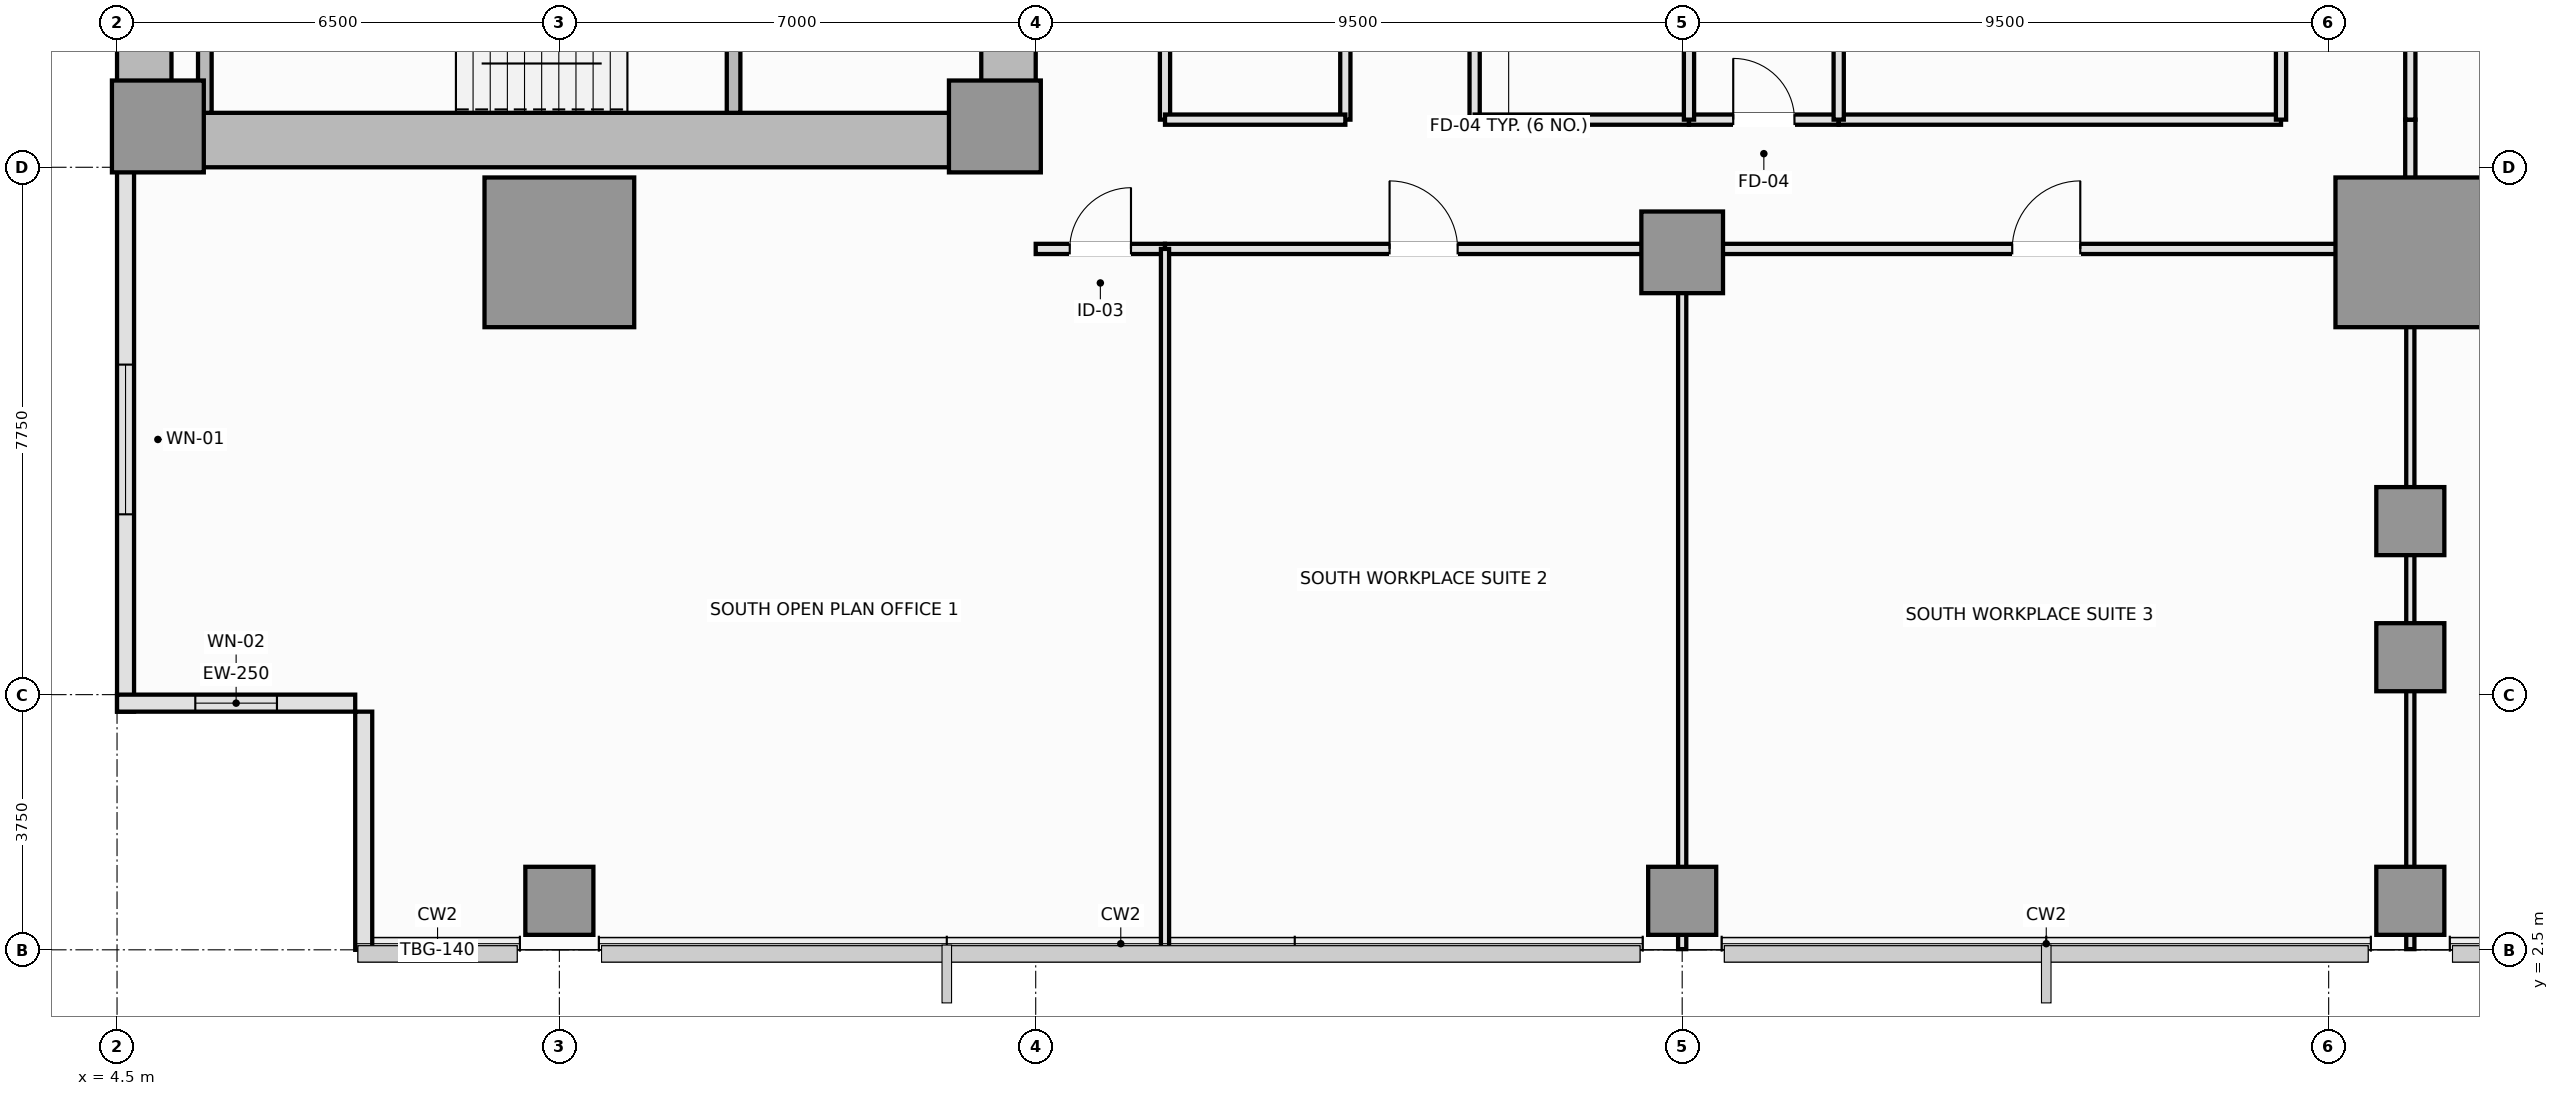
"""IFC4 building model, lengths in metres.
Left out: names, types, materials, properties, quantities, classifications, styles, units other than length and angle.
Written with IfcOpenShell. Run it as: python <this file> out.ifc"""

import sys

from ifc_helpers import new_model, si_unit, direction, frame, frame_2d, origin, origin_2d, place, context, subcontext, project, spatial, rectangle, extrude, element, fill, save


model = new_model("IFC4")
c1 = context("Model", 3, precision=1e-05, world=origin(), true_north=direction((0.0, 1.0)))
c2 = subcontext(c1, "Body", "Model", "MODEL_VIEW")
j1 = project(units=[si_unit("LENGTHUNIT", "METRE"), si_unit("PLANEANGLEUNIT", "RADIAN")], contexts=[c1])
p1 = place(None, origin())
s1 = spatial("IfcSite", under=j1, at=p1, CompositionType="ELEMENT")
p2 = place(p1, origin())
s2 = spatial("IfcBuilding", under=s1, at=p2, CompositionType="ELEMENT")
p3 = place(p2, frame((0.0, 0.0, 29.15)))
s3 = spatial("IfcBuildingStorey", under=s2, at=p3, CompositionType="ELEMENT", Elevation=29.15)
p4 = place(p3, frame((4.5, 14.4, 0.0), z_axis=(0.0, 0.0, 1.0), x_axis=(1.0, 0.0, 0.0)))
e1 = element("IfcWall", 1, at=p4, inside=s3, PredefinedType="SHEAR", context=c2, shape_type="SweptSolid", body=[
    extrude(rectangle(XDim=13.5, YDim=0.8, at=frame_2d((6.75, 0.0))), origin(), (0.0, 0.0, 1.0), 3.55),
])
p5 = place(p3, frame((4.9, 14.8, 0.0), z_axis=(0.0, 0.0, 1.0), x_axis=(0.0, 1.0, 0.0)))
e2 = element("IfcWall", 2, at=p5, inside=s3, PredefinedType="SHEAR", context=c2, shape_type="SweptSolid", body=[
    extrude(rectangle(XDim=20.9, YDim=0.8, at=frame_2d((10.45, 0.0))), origin(), (0.0, 0.0, 1.0), 3.55),
])
p6 = place(p3, frame((17.6, 14.8, 0.0), z_axis=(0.0, 0.0, 1.0), x_axis=(0.0, 1.0, 0.0)))
e3 = element("IfcWall", 3, at=p6, inside=s3, PredefinedType="SHEAR", context=c2, shape_type="SweptSolid", body=[
    extrude(rectangle(XDim=8.65, YDim=0.8, at=frame_2d((4.325, 0.0))), origin(), (0.0, 0.0, 1.0), 3.55),
])
p7 = place(p6, frame((4.1, 0.0, 0.0)))
e4 = element("IfcOpeningElement", 4, at=p7, cuts=e3, PredefinedType="OPENING", context=c2, shape_type="SweptSolid", body=[
    extrude(rectangle(XDim=1.1, YDim=2.15, at=frame_2d((0.55, 1.075))), frame((0.0, 0.41, 0.0), z_axis=(0.0, -1.0, 0.0), x_axis=(1.0, 0.0, 0.0)), (0.0, 0.0, 1.0), 0.82),
])
for number, where, z_axis, x_axis in (
    (5, (5.1, 14.6, 0.0), (0.0, 0.0, 1.0), (1.0, 0.0, 0.0)),
    (6, (17.4, 14.6, 0.0), (0.0, 0.0, 1.0), (1.0, 0.0, 0.0)),
):
    element("IfcColumn", number, at=place(p3, frame(where, z_axis=z_axis, x_axis=x_axis)), inside=s3, PredefinedType="PILASTER", context=c2, shape_type="SweptSolid", body=[
        extrude(rectangle(XDim=1.35, YDim=1.35, at=origin_2d()), origin(), (0.0, 0.0, 1.0), 3.55),
    ])
for number, where, z_axis, x_axis in (
    (7, (11.0, 12.75, 0.0), (0.0, 0.0, 1.0), (1.0, 0.0, 0.0)),
    (8, (38.2, 12.75, 0.0), (0.0, 0.0, 1.0), (1.0, 0.0, 0.0)),
):
    element("IfcColumn", number, at=place(p3, frame(where, z_axis=z_axis, x_axis=x_axis)), inside=s3, PredefinedType="COLUMN", context=c2, shape_type="SweptSolid", body=[
        extrude(rectangle(XDim=2.2, YDim=2.2, at=origin_2d()), origin(), (0.0, 0.0, 1.0), 3.55),
    ])
p8 = place(p3, frame((27.5, 12.75, 0.0), z_axis=(0.0, 0.0, 1.0), x_axis=(1.0, 0.0, 0.0)))
e9 = element("IfcColumn", 9, at=p8, inside=s3, PredefinedType="COLUMN", context=c2, shape_type="SweptSolid", body=[
    extrude(rectangle(XDim=1.2, YDim=1.2, at=origin_2d()), origin(), (0.0, 0.0, 1.0), 3.55),
])
for number, where, z_axis, x_axis in (
    (10, (38.2, 6.8, 0.0), (0.0, 0.0, 1.0), (1.0, 0.0, 0.0)),
    (11, (38.2, 8.8, 0.0), (0.0, 0.0, 1.0), (1.0, 0.0, 0.0)),
    (12, (11.0, 3.22, 0.0), (0.0, 0.0, 1.0), (1.0, 0.0, 0.0)),
    (13, (27.5, 3.22, 0.0), (0.0, 0.0, 1.0), (1.0, 0.0, 0.0)),
    (14, (38.2, 3.22, 0.0), (0.0, 0.0, 1.0), (1.0, 0.0, 0.0)),
):
    element("IfcColumn", number, at=place(p3, frame(where, z_axis=z_axis, x_axis=x_axis)), inside=s3, PredefinedType="COLUMN", context=c2, shape_type="SweptSolid", body=[
        extrude(rectangle(XDim=1.0, YDim=1.0, at=origin_2d()), origin(), (0.0, 0.0, 1.0), 3.55),
    ])
p9 = place(p3, frame((4.625, 14.0, 0.0), z_axis=(0.0, 0.0, 1.0), x_axis=(0.0, -1.0, 0.0)))
e15 = element("IfcWall", 15, at=p9, inside=s3, PredefinedType="SOLIDWALL", context=c2, shape_type="SweptSolid", body=[
    extrude(rectangle(XDim=8.0, YDim=0.25, at=frame_2d((4.0, 0.0))), origin(), (0.0, 0.0, 1.0), 3.37),
])
p10 = place(p9, frame((2.9, 0.0, 0.9)))
e16 = element("IfcOpeningElement", 16, at=p10, cuts=e15, PredefinedType="OPENING", context=c2, shape_type="SweptSolid", body=[
    extrude(rectangle(XDim=2.2, YDim=1.8, at=frame_2d((1.1, 0.9))), frame((0.0, 0.135, 0.0), z_axis=(0.0, -1.0, 0.0), x_axis=(1.0, 0.0, 0.0)), (0.0, 0.0, 1.0), 0.27),
])
p11 = place(p3, frame((4.5, 6.125, 0.0), z_axis=(0.0, 0.0, 1.0), x_axis=(1.0, 0.0, 0.0)))
e17 = element("IfcWall", 17, at=p11, inside=s3, PredefinedType="SOLIDWALL", context=c2, shape_type="SweptSolid", body=[
    extrude(rectangle(XDim=3.5, YDim=0.25, at=frame_2d((1.75, 0.0))), origin(), (0.0, 0.0, 1.0), 3.37),
])
p12 = place(p11, frame((1.15, 0.0, 0.9)))
e18 = element("IfcOpeningElement", 18, at=p12, cuts=e17, PredefinedType="OPENING", context=c2, shape_type="SweptSolid", body=[
    extrude(rectangle(XDim=1.2, YDim=1.8, at=frame_2d((0.6, 0.9))), frame((0.0, 0.135, 0.0), z_axis=(0.0, -1.0, 0.0), x_axis=(1.0, 0.0, 0.0)), (0.0, 0.0, 1.0), 0.27),
])
p13 = place(p3, frame((8.125, 6.0, 0.0), z_axis=(0.0, 0.0, 1.0), x_axis=(0.0, -1.0, 0.0)))
e19 = element("IfcWall", 19, at=p13, inside=s3, PredefinedType="SOLIDWALL", context=c2, shape_type="SweptSolid", body=[
    extrude(rectangle(XDim=3.5, YDim=0.25, at=frame_2d((1.75, 0.0))), origin(), (0.0, 0.0, 1.0), 3.37),
])
p14 = place(p3, frame((5.79, 14.8, 0.0), z_axis=(0.0, 0.0, 1.0), x_axis=(0.0, 1.0, 0.0)))
e20 = element("IfcWall", 20, at=p14, inside=s3, PredefinedType="SOLIDWALL", context=c2, shape_type="SweptSolid", body=[
    extrude(rectangle(XDim=3.05, YDim=0.2, at=frame_2d((1.525, 0.0))), origin(), (0.0, 0.0, 1.0), 3.55),
])
p15 = place(p3, frame((13.56, 14.8, 0.0), z_axis=(0.0, 0.0, 1.0), x_axis=(0.0, 1.0, 0.0)))
e21 = element("IfcWall", 21, at=p15, inside=s3, PredefinedType="SOLIDWALL", context=c2, shape_type="SweptSolid", body=[
    extrude(rectangle(XDim=3.05, YDim=0.2, at=frame_2d((1.525, 0.0))), origin(), (0.0, 0.0, 1.0), 3.55),
])
p16 = place(p15, frame((0.95, 0.0, 0.0)))
e22 = element("IfcOpeningElement", 22, at=p16, cuts=e21, PredefinedType="OPENING", context=c2, shape_type="SweptSolid", body=[
    extrude(rectangle(XDim=1.15, YDim=2.15, at=frame_2d((0.575, 1.075))), frame((0.0, 0.11, 0.0), z_axis=(0.0, -1.0, 0.0), x_axis=(1.0, 0.0, 0.0)), (0.0, 0.0, 1.0), 0.22),
])
p17 = place(p3, frame((22.55, 14.7, 0.0), z_axis=(0.0, 0.0, 1.0), x_axis=(0.0, 1.0, 0.0)))
e23 = element("IfcWall", 23, at=p17, inside=s3, PredefinedType="PARTITIONING", context=c2, shape_type="SweptSolid", body=[
    extrude(rectangle(XDim=3.03, YDim=0.15, at=frame_2d((1.515, 0.0))), origin(), (0.0, 0.0, 1.0), 3.01),
])
p18 = place(p17, frame((1.015, 0.0, 0.0)))
e24 = element("IfcOpeningElement", 24, at=p18, cuts=e23, PredefinedType="OPENING", context=c2, shape_type="SweptSolid", body=[
    extrude(rectangle(XDim=1.0, YDim=2.15, at=frame_2d((0.5, 1.075))), frame((0.0, 0.085, 0.0), z_axis=(0.0, -1.0, 0.0), x_axis=(1.0, 0.0, 0.0)), (0.0, 0.0, 1.0), 0.17),
])
p19 = place(p3, frame((24.45, 14.7, 0.0), z_axis=(0.0, 0.0, 1.0), x_axis=(0.0, 1.0, 0.0)))
e25 = element("IfcWall", 25, at=p19, inside=s3, PredefinedType="PLUMBINGWALL", context=c2, shape_type="SweptSolid", body=[
    extrude(rectangle(XDim=3.1, YDim=0.15, at=frame_2d((1.55, 0.0))), origin(), (0.0, 0.0, 1.0), 3.37),
])
p20 = place(p19, frame((1.1, 0.0, 0.0)))
e26 = element("IfcOpeningElement", 26, at=p20, cuts=e25, PredefinedType="OPENING", context=c2, shape_type="SweptSolid", body=[
    extrude(rectangle(XDim=0.9, YDim=2.1, at=frame_2d((0.45, 1.05))), frame((0.0, 0.085, 0.0), z_axis=(0.0, -1.0, 0.0), x_axis=(1.0, 0.0, 0.0)), (0.0, 0.0, 1.0), 0.17),
])
p21 = place(p3, frame((19.9, 14.7, 0.0), z_axis=(0.0, 0.0, 1.0), x_axis=(0.0, 1.0, 0.0)))
e27 = element("IfcWall", 27, at=p21, inside=s3, PredefinedType="PARTITIONING", context=c2, shape_type="SweptSolid", body=[
    extrude(rectangle(XDim=3.03, YDim=0.15, at=frame_2d((1.515, 0.0))), origin(), (0.0, 0.0, 1.0), 3.37),
])
p22 = place(p3, frame((19.9, 14.7, 0.0), z_axis=(0.0, 0.0, 1.0), x_axis=(1.0, 0.0, 0.0)))
e28 = element("IfcWall", 28, at=p22, inside=s3, PredefinedType="PARTITIONING", context=c2, shape_type="SweptSolid", body=[
    extrude(rectangle(XDim=2.65, YDim=0.15, at=frame_2d((1.325, 0.0))), origin(), (0.0, 0.0, 1.0), 3.37),
])
p23 = place(p3, frame((24.45, 14.7, 0.0), z_axis=(0.0, 0.0, 1.0), x_axis=(1.0, 0.0, 0.0)))
e29 = element("IfcWall", 29, at=p23, inside=s3, PredefinedType="PLUMBINGWALL", context=c2, shape_type="SweptSolid", body=[
    extrude(rectangle(XDim=3.15, YDim=0.15, at=frame_2d((1.575, 0.0))), origin(), (0.0, 0.0, 1.0), 3.37),
])
p24 = place(p3, frame((27.6, 14.7, 0.0), z_axis=(0.0, 0.0, 1.0), x_axis=(1.0, 0.0, 0.0)))
e30 = element("IfcWall", 30, at=p24, inside=s3, PredefinedType="PLUMBINGWALL", context=c2, shape_type="SweptSolid", body=[
    extrude(rectangle(XDim=2.2, YDim=0.15, at=frame_2d((1.1, 0.0))), origin(), (0.0, 0.0, 1.0), 3.37),
])
p25 = place(p24, frame((0.65, 0.0, 0.0)))
e31 = element("IfcOpeningElement", 31, at=p25, cuts=e30, PredefinedType="OPENING", context=c2, shape_type="SweptSolid", body=[
    extrude(rectangle(XDim=0.9, YDim=2.1, at=frame_2d((0.45, 1.05))), frame((0.0, 0.085, 0.0), z_axis=(0.0, -1.0, 0.0), x_axis=(1.0, 0.0, 0.0)), (0.0, 0.0, 1.0), 0.17),
])
p26 = place(p3, frame((29.8, 14.7, 0.0), z_axis=(0.0, 0.0, 1.0), x_axis=(1.0, 0.0, 0.0)))
e32 = element("IfcWall", 32, at=p26, inside=s3, PredefinedType="PARTITIONING", context=c2, shape_type="SweptSolid", body=[
    extrude(rectangle(XDim=6.5, YDim=0.15, at=frame_2d((3.25, 0.0))), origin(), (0.0, 0.0, 1.0), 3.37),
])
p27 = place(p3, frame((18.0, 12.8, 0.0), z_axis=(0.0, 0.0, 1.0), x_axis=(1.0, 0.0, 0.0)))
e33 = element("IfcWall", 33, at=p27, inside=s3, PredefinedType="PARTITIONING", context=c2, shape_type="SweptSolid", body=[
    extrude(rectangle(XDim=1.9, YDim=0.15, at=frame_2d((0.95, 0.0))), origin(), (0.0, 0.0, 1.0), 2.72),
])
p28 = place(p27, frame((0.5, 0.0, 0.0)))
e34 = element("IfcOpeningElement", 34, at=p28, cuts=e33, PredefinedType="OPENING", context=c2, shape_type="SweptSolid", body=[
    extrude(rectangle(XDim=0.9, YDim=2.1, at=frame_2d((0.45, 1.05))), frame((0.0, 0.085, 0.0), z_axis=(0.0, -1.0, 0.0), x_axis=(1.0, 0.0, 0.0)), (0.0, 0.0, 1.0), 0.17),
])
p29 = place(p3, frame((19.9, 12.8, 0.0), z_axis=(0.0, 0.0, 1.0), x_axis=(1.0, 0.0, 0.0)))
e35 = element("IfcWall", 35, at=p29, inside=s3, PredefinedType="PARTITIONING", context=c2, shape_type="SweptSolid", body=[
    extrude(rectangle(XDim=7.6, YDim=0.15, at=frame_2d((3.8, 0.0))), origin(), (0.0, 0.0, 1.0), 2.72),
])
p30 = place(p29, frame((3.3, 0.0, 0.0)))
e36 = element("IfcOpeningElement", 36, at=p30, cuts=e35, PredefinedType="OPENING", context=c2, shape_type="SweptSolid", body=[
    extrude(rectangle(XDim=1.0, YDim=2.15, at=frame_2d((0.5, 1.075))), frame((0.0, 0.085, 0.0), z_axis=(0.0, -1.0, 0.0), x_axis=(1.0, 0.0, 0.0)), (0.0, 0.0, 1.0), 0.17),
])
p31 = place(p3, frame((27.5, 12.8, 0.0), z_axis=(0.0, 0.0, 1.0), x_axis=(1.0, 0.0, 0.0)))
e37 = element("IfcWall", 37, at=p31, inside=s3, PredefinedType="PARTITIONING", context=c2, shape_type="SweptSolid", body=[
    extrude(rectangle(XDim=10.7, YDim=0.15, at=frame_2d((5.35, 0.0))), origin(), (0.0, 0.0, 1.0), 2.72),
])
p32 = place(p31, frame((4.85, 0.0, 0.0)))
e38 = element("IfcOpeningElement", 38, at=p32, cuts=e37, PredefinedType="OPENING", context=c2, shape_type="SweptSolid", body=[
    extrude(rectangle(XDim=1.0, YDim=2.15, at=frame_2d((0.5, 1.075))), frame((0.0, 0.085, 0.0), z_axis=(0.0, -1.0, 0.0), x_axis=(1.0, 0.0, 0.0)), (0.0, 0.0, 1.0), 0.17),
])
p33 = place(p3, frame((38.2, 12.8, 0.0), z_axis=(0.0, 0.0, 1.0), x_axis=(0.0, 1.0, 0.0)))
e39 = element("IfcWall", 39, at=p33, inside=s3, PredefinedType="PARTITIONING", context=c2, shape_type="SweptSolid", body=[
    extrude(rectangle(XDim=1.9, YDim=0.15, at=frame_2d((0.95, 0.0))), origin(), (0.0, 0.0, 1.0), 2.82),
])
p34 = place(p3, frame((36.3, 14.7, 0.0), z_axis=(0.0, 0.0, 1.0), x_axis=(0.0, 1.0, 0.0)))
e40 = element("IfcWall", 40, at=p34, inside=s3, PredefinedType="PARTITIONING", context=c2, shape_type="SweptSolid", body=[
    extrude(rectangle(XDim=3.1, YDim=0.15, at=frame_2d((1.55, 0.0))), origin(), (0.0, 0.0, 1.0), 3.37),
])
p35 = place(p34, frame((1.05, 0.0, 0.0)))
e41 = element("IfcOpeningElement", 41, at=p35, cuts=e40, PredefinedType="OPENING", context=c2, shape_type="SweptSolid", body=[
    extrude(rectangle(XDim=1.0, YDim=2.15, at=frame_2d((0.5, 1.075))), frame((0.0, 0.085, 0.0), z_axis=(0.0, -1.0, 0.0), x_axis=(1.0, 0.0, 0.0)), (0.0, 0.0, 1.0), 0.17),
])
p36 = place(p3, frame((38.2, 14.7, 0.0), z_axis=(0.0, 0.0, 1.0), x_axis=(0.0, 1.0, 0.0)))
e42 = element("IfcWall", 42, at=p36, inside=s3, PredefinedType="PARTITIONING", context=c2, shape_type="SweptSolid", body=[
    extrude(rectangle(XDim=3.8, YDim=0.15, at=frame_2d((1.9, 0.0))), origin(), (0.0, 0.0, 1.0), 2.82),
])
p37 = place(p36, frame((1.4, 0.0, 0.0)))
e43 = element("IfcOpeningElement", 43, at=p37, cuts=e42, PredefinedType="OPENING", context=c2, shape_type="SweptSolid", body=[
    extrude(rectangle(XDim=1.0, YDim=2.15, at=frame_2d((0.5, 1.075))), frame((0.0, 0.085, 0.0), z_axis=(0.0, -1.0, 0.0), x_axis=(1.0, 0.0, 0.0)), (0.0, 0.0, 1.0), 0.17),
])
for number, where, z_axis, x_axis in (
    (44, (27.6, 14.7, 0.0), (0.0, 0.0, 1.0), (0.0, 1.0, 0.0)),
    (45, (29.8, 14.7, 0.0), (0.0, 0.0, 1.0), (0.0, 1.0, 0.0)),
):
    element("IfcWall", number, at=place(p3, frame(where, z_axis=z_axis, x_axis=x_axis)), inside=s3, PredefinedType="PLUMBINGWALL", context=c2, shape_type="SweptSolid", body=[
        extrude(rectangle(XDim=3.1, YDim=0.15, at=frame_2d((1.55, 0.0))), origin(), (0.0, 0.0, 1.0), 3.37),
    ])
p38 = place(p3, frame((19.9, 2.51, 0.0), z_axis=(0.0, 0.0, 1.0), x_axis=(0.0, 1.0, 0.0)))
e46 = element("IfcWall", 46, at=p38, inside=s3, PredefinedType="PARTITIONING", context=c2, shape_type="SweptSolid", body=[
    extrude(rectangle(XDim=10.29, YDim=0.12, at=frame_2d((5.145, 0.0))), origin(), (0.0, 0.0, 1.0), 3.37),
])
for number, where, z_axis, x_axis in (
    (47, (27.5, 2.51, 0.0), (0.0, 0.0, 1.0), (0.0, 1.0, 0.0)),
    (48, (38.2, 2.51, 0.0), (0.0, 0.0, 1.0), (0.0, 1.0, 0.0)),
):
    element("IfcWall", number, at=place(p3, frame(where, z_axis=z_axis, x_axis=x_axis)), inside=s3, PredefinedType="PARTITIONING", context=c2, shape_type="SweptSolid", body=[
        extrude(rectangle(XDim=10.29, YDim=0.12, at=frame_2d((5.145, 0.0))), origin(), (0.0, 0.0, 1.0), 2.82),
    ])
p39 = place(p10, origin())
e49 = element("IfcWindow", 49, at=p39, inside=s3, PartitioningType="SINGLE_PANEL", PredefinedType="WINDOW", context=c2, shape_type="SweptSolid", body=[
    extrude(rectangle(XDim=2.2, YDim=1.8, at=frame_2d((1.1, 0.9))), frame((0.0, 0.03, 0.0), z_axis=(0.0, -1.0, 0.0), x_axis=(1.0, 0.0, 0.0)), (0.0, 0.0, 1.0), 0.06),
])
fill(e16, e49)
p40 = place(p12, origin())
e50 = element("IfcWindow", 50, at=p40, inside=s3, PartitioningType="SINGLE_PANEL", PredefinedType="WINDOW", context=c2, shape_type="SweptSolid", body=[
    extrude(rectangle(XDim=1.2, YDim=1.8, at=frame_2d((0.6, 0.9))), frame((0.0, 0.03, 0.0), z_axis=(0.0, -1.0, 0.0), x_axis=(1.0, 0.0, 0.0)), (0.0, 0.0, 1.0), 0.06),
])
fill(e18, e50)
p41 = place(p25, origin())
e51 = element("IfcDoor", 51, at=p41, inside=s3, OperationType="SINGLE_SWING_LEFT", PredefinedType="DOOR", context=c2, shape_type="SweptSolid", body=[
    extrude(rectangle(XDim=0.9, YDim=2.1, at=frame_2d((0.45, 1.05))), frame((0.0, 0.025, 0.0), z_axis=(0.0, -1.0, 0.0), x_axis=(1.0, 0.0, 0.0)), (0.0, 0.0, 1.0), 0.05),
])
fill(e31, e51)
p42 = place(p28, origin())
e52 = element("IfcDoor", 52, at=p42, inside=s3, OperationType="SINGLE_SWING_RIGHT", PredefinedType="DOOR", context=c2, shape_type="SweptSolid", body=[
    extrude(rectangle(XDim=0.9, YDim=2.1, at=frame_2d((0.45, 1.05))), frame((0.0, 0.025, 0.0), z_axis=(0.0, -1.0, 0.0), x_axis=(1.0, 0.0, 0.0)), (0.0, 0.0, 1.0), 0.05),
])
fill(e34, e52)
p43 = place(p30, origin())
e53 = element("IfcDoor", 53, at=p43, inside=s3, OperationType="SINGLE_SWING_LEFT", PredefinedType="DOOR", context=c2, shape_type="SweptSolid", body=[
    extrude(rectangle(XDim=1.0, YDim=2.15, at=frame_2d((0.5, 1.075))), frame((0.0, 0.025, 0.0), z_axis=(0.0, -1.0, 0.0), x_axis=(1.0, 0.0, 0.0)), (0.0, 0.0, 1.0), 0.05),
])
fill(e36, e53)
p44 = place(p32, origin())
e54 = element("IfcDoor", 54, at=p44, inside=s3, OperationType="SINGLE_SWING_RIGHT", PredefinedType="DOOR", context=c2, shape_type="SweptSolid", body=[
    extrude(rectangle(XDim=1.0, YDim=2.15, at=frame_2d((0.5, 1.075))), frame((0.0, 0.025, 0.0), z_axis=(0.0, -1.0, 0.0), x_axis=(1.0, 0.0, 0.0)), (0.0, 0.0, 1.0), 0.05),
])
fill(e38, e54)
save(model, sys.argv[1])
